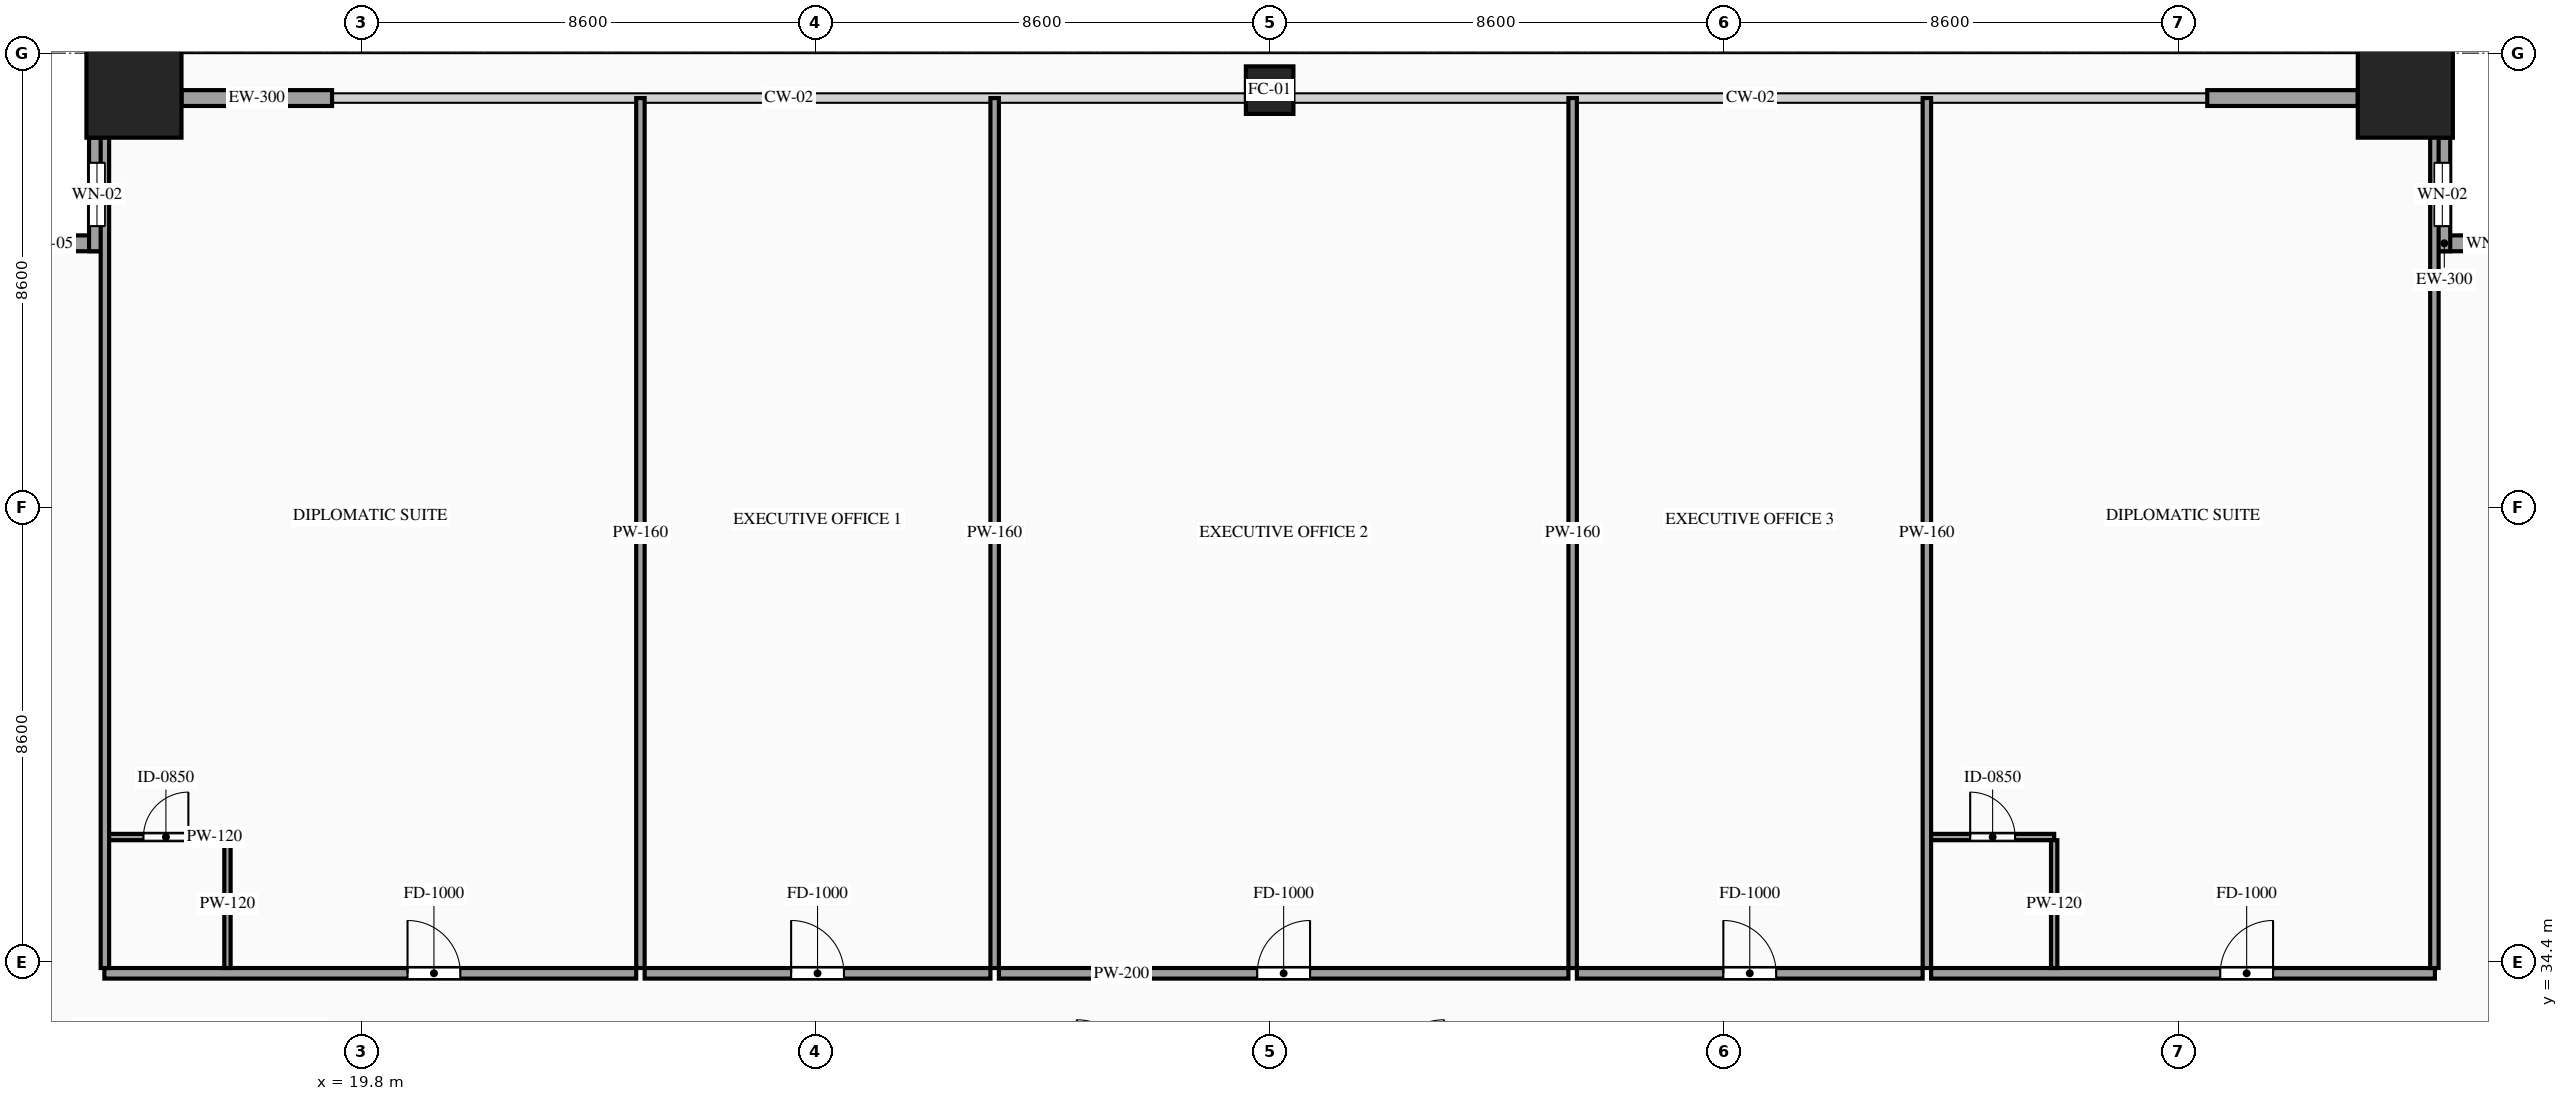
"""IFC4 building model, lengths in metres.
Left out: names, types, materials, properties, quantities, classifications, styles, units other than length and angle.
Written with IfcOpenShell. Run it as: python <this file> out.ifc"""

import sys

from ifc_helpers import new_model, si_unit, direction, frame, frame_2d, origin, origin_2d, place, context, subcontext, project, spatial, rectangle, hollow_rectangle, extrude, source, transform, mapped, element, fill, save


model = new_model("IFC4")
c1 = context("Model", 3, precision=1e-05, world=origin(), true_north=direction((0.0, 1.0)))
c2 = subcontext(c1, "Body", "Model", "MODEL_VIEW")
j1 = project(units=[si_unit("LENGTHUNIT", "METRE"), si_unit("PLANEANGLEUNIT", "RADIAN")], contexts=[c1])
p1 = place(None, origin())
s1 = spatial("IfcSite", under=j1, at=p1, CompositionType="ELEMENT")
p2 = place(p1, origin())
s2 = spatial("IfcBuilding", under=s1, at=p2, CompositionType="ELEMENT")
p3 = place(p2, frame((0.0, 0.0, 64.0)))
s3 = spatial("IfcBuildingStorey", under=s2, at=p3, CompositionType="ELEMENT", Elevation=64.0)
m1 = source(origin(), c2, "Body", "SweptSolid", [
    extrude(hollow_rectangle(XDim=1.8, YDim=1.8, WallThickness=0.08, at=origin_2d()), origin(), (0.0, 0.0, 1.0), 3.6),
])
p4 = place(p3, frame((15.5, 50.9, 0.0), z_axis=(0.0, 0.0, 1.0), x_axis=(1.0, 0.0, 0.0)))
e1 = element("IfcColumn", 1, at=p4, inside=s3, PredefinedType="COLUMN", context=c2, shape_type="MappedRepresentation", body=[
    mapped(m1, transform((0.0, 0.0, 0.0), scale=1.0)),
])
m2 = source(origin(), c2, "Body", "SweptSolid", [
    extrude(hollow_rectangle(XDim=0.9, YDim=0.9, WallThickness=0.042, at=origin_2d()), origin(), (0.0, 0.0, 1.0), 3.6),
])
p5 = place(p3, frame((37.0, 50.9, 0.0), z_axis=(0.0, 0.0, 1.0), x_axis=(1.0, 0.0, 0.0)))
e2 = element("IfcColumn", 2, at=p5, inside=s3, PredefinedType="COLUMN", context=c2, shape_type="MappedRepresentation", body=[
    mapped(m2, transform((0.0, 0.0, 0.0), scale=1.0)),
])
p6 = place(p3, frame((58.5, 50.9, 0.0), z_axis=(0.0, 0.0, 1.0), x_axis=(1.0, 0.0, 0.0)))
e3 = element("IfcColumn", 3, at=p6, inside=s3, PredefinedType="COLUMN", context=c2, shape_type="MappedRepresentation", body=[
    mapped(m1, transform((0.0, 0.0, 0.0), scale=1.0)),
])
p7 = place(p3, frame((14.95, 48.0, 0.0), z_axis=(0.0, 0.0, 1.0), x_axis=(-1.0, 0.0, 0.0)))
e4 = element("IfcWall", 4, at=p7, inside=s3, PredefinedType="SOLIDWALL", context=c2, shape_type="SweptSolid", body=[
    extrude(rectangle(XDim=2.15, YDim=0.3, at=frame_2d((1.075, 0.0))), origin(), (0.0, 0.0, 1.0), 3.38),
])
p8 = place(p7, frame((0.625, 0.0, 0.85)))
e5 = element("IfcOpeningElement", 5, at=p8, cuts=e4, PredefinedType="OPENING", context=c2, shape_type="SweptSolid", body=[
    extrude(rectangle(XDim=0.9, YDim=1.5, at=frame_2d((0.45, 0.75))), frame((0.0, 0.165, 0.0), z_axis=(0.0, -1.0, 0.0), x_axis=(1.0, 0.0, 0.0)), (0.0, 0.0, 1.0), 0.33),
])
p9 = place(p3, frame((14.8, 50.0, 0.0), z_axis=(0.0, 0.0, 1.0), x_axis=(0.0, -1.0, 0.0)))
e6 = element("IfcWall", 6, at=p9, inside=s3, PredefinedType="SOLIDWALL", context=c2, shape_type="SweptSolid", body=[
    extrude(rectangle(XDim=2.15, YDim=0.3, at=frame_2d((1.075, 0.0))), origin(), (0.0, 0.0, 1.0), 3.38),
])
p10 = place(p9, frame((0.475, 0.0, 0.85)))
e7 = element("IfcOpeningElement", 7, at=p10, cuts=e6, PredefinedType="OPENING", context=c2, shape_type="SweptSolid", body=[
    extrude(rectangle(XDim=1.2, YDim=2.1, at=frame_2d((0.6, 1.05))), frame((0.0, 0.165, 0.0), z_axis=(0.0, -1.0, 0.0), x_axis=(1.0, 0.0, 0.0)), (0.0, 0.0, 1.0), 0.33),
])
p11 = place(p3, frame((61.2, 48.0, 0.0), z_axis=(0.0, 0.0, 1.0), x_axis=(-1.0, 0.0, 0.0)))
e8 = element("IfcWall", 8, at=p11, inside=s3, PredefinedType="SOLIDWALL", context=c2, shape_type="SweptSolid", body=[
    extrude(rectangle(XDim=2.15, YDim=0.3, at=frame_2d((1.075, 0.0))), origin(), (0.0, 0.0, 1.0), 3.38),
])
p12 = place(p11, frame((0.625, 0.0, 0.85)))
e9 = element("IfcOpeningElement", 9, at=p12, cuts=e8, PredefinedType="OPENING", context=c2, shape_type="SweptSolid", body=[
    extrude(rectangle(XDim=0.9, YDim=1.5, at=frame_2d((0.45, 0.75))), frame((0.0, 0.165, 0.0), z_axis=(0.0, -1.0, 0.0), x_axis=(1.0, 0.0, 0.0)), (0.0, 0.0, 1.0), 0.33),
])
p13 = place(p3, frame((59.2, 47.85, 0.0), z_axis=(0.0, 0.0, 1.0), x_axis=(0.0, 1.0, 0.0)))
e10 = element("IfcWall", 10, at=p13, inside=s3, PredefinedType="SOLIDWALL", context=c2, shape_type="SweptSolid", body=[
    extrude(rectangle(XDim=2.15, YDim=0.3, at=frame_2d((1.075, 0.0))), origin(), (0.0, 0.0, 1.0), 3.38),
])
p14 = place(p13, frame((0.475, 0.0, 0.85)))
e11 = element("IfcOpeningElement", 11, at=p14, cuts=e10, PredefinedType="OPENING", context=c2, shape_type="SweptSolid", body=[
    extrude(rectangle(XDim=1.2, YDim=2.1, at=frame_2d((0.6, 1.05))), frame((0.0, 0.165, 0.0), z_axis=(0.0, -1.0, 0.0), x_axis=(1.0, 0.0, 0.0)), (0.0, 0.0, 1.0), 0.33),
])
m3 = source(origin(), c2, "Body", "SweptSolid", [
    extrude(rectangle(XDim=2.85, YDim=0.3, at=frame_2d((1.425, 0.0))), origin(), (0.0, 0.0, 1.0), 2.775),
])
for number, where, z_axis, x_axis in (
    (12, (16.4, 50.75, 0.0), (0.0, 0.0, 1.0), (1.0, 0.0, 0.0)),
    (13, (54.75, 50.75, 0.0), (0.0, 0.0, 1.0), (1.0, 0.0, 0.0)),
):
    element("IfcWall", number, at=place(p3, frame(where, z_axis=z_axis, x_axis=x_axis)), inside=s3, PredefinedType="SOLIDWALL", context=c2, shape_type="MappedRepresentation", body=[
        mapped(m3, transform((0.0, 0.0, 0.0), scale=1.0)),
    ])
p15 = place(p3, frame((14.94, 34.18, 0.0), z_axis=(0.0, 0.0, 1.0), x_axis=(1.0, 0.0, 0.0)))
e14 = element("IfcWall", 14, at=p15, inside=s3, PredefinedType="PARTITIONING", context=c2, shape_type="SweptSolid", body=[
    extrude(rectangle(XDim=10.068, YDim=0.2, at=frame_2d((5.034, 0.0))), origin(), (0.0, 0.0, 1.0), 3.38),
])
p16 = place(p15, frame((5.739, 0.0, 0.0)))
e15 = element("IfcOpeningElement", 15, at=p16, cuts=e14, PredefinedType="OPENING", context=c2, shape_type="SweptSolid", body=[
    extrude(rectangle(XDim=1.0, YDim=2.2, at=frame_2d((0.5, 1.1))), frame((0.0, 0.115, 0.0), z_axis=(0.0, -1.0, 0.0), x_axis=(1.0, 0.0, 0.0)), (0.0, 0.0, 1.0), 0.23),
])
m4 = source(origin(), c2, "Body", "SweptSolid", [
    extrude(rectangle(XDim=16.47, YDim=0.16, at=frame_2d((8.235, 0.0))), origin(), (0.0, 0.0, 1.0), 3.38),
])
p17 = place(p3, frame((25.088, 34.28, 0.0), z_axis=(0.0, 0.0, 1.0), x_axis=(0.0, 1.0, 0.0)))
e16 = element("IfcWall", 16, at=p17, inside=s3, PredefinedType="PARTITIONING", context=c2, shape_type="MappedRepresentation", body=[
    mapped(m4, transform((0.0, 0.0, 0.0), scale=1.0)),
])
p18 = place(p3, frame((14.94, 36.76, 0.0), z_axis=(0.0, 0.0, 1.0), x_axis=(1.0, 0.0, 0.0)))
e17 = element("IfcWall", 17, at=p18, inside=s3, PredefinedType="PARTITIONING", context=c2, shape_type="SweptSolid", body=[
    extrude(rectangle(XDim=2.33, YDim=0.12, at=frame_2d((1.165, 0.0))), origin(), (0.0, 0.0, 1.0), 3.38),
])
p19 = place(p18, frame((0.74, 0.0, 0.0)))
e18 = element("IfcOpeningElement", 18, at=p19, cuts=e17, PredefinedType="OPENING", context=c2, shape_type="SweptSolid", body=[
    extrude(rectangle(XDim=0.85, YDim=2.1, at=frame_2d((0.425, 1.05))), frame((0.0, 0.075, 0.0), z_axis=(0.0, -1.0, 0.0), x_axis=(1.0, 0.0, 0.0)), (0.0, 0.0, 1.0), 0.15),
])
m5 = source(origin(), c2, "Body", "SweptSolid", [
    extrude(rectangle(XDim=2.42, YDim=0.12, at=frame_2d((1.21, 0.0))), origin(), (0.0, 0.0, 1.0), 3.38),
])
p20 = place(p3, frame((17.27, 34.28, 0.0), z_axis=(0.0, 0.0, 1.0), x_axis=(0.0, 1.0, 0.0)))
e19 = element("IfcWall", 19, at=p20, inside=s3, PredefinedType="PARTITIONING", context=c2, shape_type="MappedRepresentation", body=[
    mapped(m5, transform((0.0, 0.0, 0.0), scale=1.0)),
])
p21 = place(p3, frame((25.168, 34.18, 0.0), z_axis=(0.0, 0.0, 1.0), x_axis=(1.0, 0.0, 0.0)))
e20 = element("IfcWall", 20, at=p21, inside=s3, PredefinedType="PARTITIONING", context=c2, shape_type="SweptSolid", body=[
    extrude(rectangle(XDim=6.546, YDim=0.2, at=frame_2d((3.273, 0.0))), origin(), (0.0, 0.0, 1.0), 3.38),
])
p22 = place(p21, frame((2.773, 0.0, 0.0)))
e21 = element("IfcOpeningElement", 21, at=p22, cuts=e20, PredefinedType="OPENING", context=c2, shape_type="SweptSolid", body=[
    extrude(rectangle(XDim=1.0, YDim=2.2, at=frame_2d((0.5, 1.1))), frame((0.0, 0.115, 0.0), z_axis=(0.0, -1.0, 0.0), x_axis=(1.0, 0.0, 0.0)), (0.0, 0.0, 1.0), 0.23),
])
p23 = place(p3, frame((31.794, 34.28, 0.0), z_axis=(0.0, 0.0, 1.0), x_axis=(0.0, 1.0, 0.0)))
e22 = element("IfcWall", 22, at=p23, inside=s3, PredefinedType="PARTITIONING", context=c2, shape_type="MappedRepresentation", body=[
    mapped(m4, transform((0.0, 0.0, 0.0), scale=1.0)),
])
p24 = place(p3, frame((31.874, 34.18, 0.0), z_axis=(0.0, 0.0, 1.0), x_axis=(1.0, 0.0, 0.0)))
e23 = element("IfcWall", 23, at=p24, inside=s3, PredefinedType="PARTITIONING", context=c2, shape_type="SweptSolid", body=[
    extrude(rectangle(XDim=10.782, YDim=0.2, at=frame_2d((5.391, 0.0))), origin(), (0.0, 0.0, 1.0), 3.38),
])
p25 = place(p24, frame((4.891, 0.0, 0.0)))
e24 = element("IfcOpeningElement", 24, at=p25, cuts=e23, PredefinedType="OPENING", context=c2, shape_type="SweptSolid", body=[
    extrude(rectangle(XDim=1.0, YDim=2.2, at=frame_2d((0.5, 1.1))), frame((0.0, 0.115, 0.0), z_axis=(0.0, -1.0, 0.0), x_axis=(1.0, 0.0, 0.0)), (0.0, 0.0, 1.0), 0.23),
])
p26 = place(p3, frame((42.736, 34.28, 0.0), z_axis=(0.0, 0.0, 1.0), x_axis=(0.0, 1.0, 0.0)))
e25 = element("IfcWall", 25, at=p26, inside=s3, PredefinedType="PARTITIONING", context=c2, shape_type="MappedRepresentation", body=[
    mapped(m4, transform((0.0, 0.0, 0.0), scale=1.0)),
])
p27 = place(p3, frame((42.816, 34.18, 0.0), z_axis=(0.0, 0.0, 1.0), x_axis=(1.0, 0.0, 0.0)))
e26 = element("IfcWall", 26, at=p27, inside=s3, PredefinedType="PARTITIONING", context=c2, shape_type="SweptSolid", body=[
    extrude(rectangle(XDim=6.546, YDim=0.2, at=frame_2d((3.273, 0.0))), origin(), (0.0, 0.0, 1.0), 3.38),
])
p28 = place(p27, frame((2.773, 0.0, 0.0)))
e27 = element("IfcOpeningElement", 27, at=p28, cuts=e26, PredefinedType="OPENING", context=c2, shape_type="SweptSolid", body=[
    extrude(rectangle(XDim=1.0, YDim=2.2, at=frame_2d((0.5, 1.1))), frame((0.0, 0.115, 0.0), z_axis=(0.0, -1.0, 0.0), x_axis=(1.0, 0.0, 0.0)), (0.0, 0.0, 1.0), 0.23),
])
p29 = place(p3, frame((49.442, 34.28, 0.0), z_axis=(0.0, 0.0, 1.0), x_axis=(0.0, 1.0, 0.0)))
e28 = element("IfcWall", 28, at=p29, inside=s3, PredefinedType="PARTITIONING", context=c2, shape_type="MappedRepresentation", body=[
    mapped(m4, transform((0.0, 0.0, 0.0), scale=1.0)),
])
p30 = place(p3, frame((49.522, 34.18, 0.0), z_axis=(0.0, 0.0, 1.0), x_axis=(1.0, 0.0, 0.0)))
e29 = element("IfcWall", 29, at=p30, inside=s3, PredefinedType="PARTITIONING", context=c2, shape_type="SweptSolid", body=[
    extrude(rectangle(XDim=9.538, YDim=0.2, at=frame_2d((4.769, 0.0))), origin(), (0.0, 0.0, 1.0), 3.38),
])
p31 = place(p30, frame((5.474, 0.0, 0.0)))
e30 = element("IfcOpeningElement", 30, at=p31, cuts=e29, PredefinedType="OPENING", context=c2, shape_type="SweptSolid", body=[
    extrude(rectangle(XDim=1.0, YDim=2.2, at=frame_2d((0.5, 1.1))), frame((0.0, 0.115, 0.0), z_axis=(0.0, -1.0, 0.0), x_axis=(1.0, 0.0, 0.0)), (0.0, 0.0, 1.0), 0.23),
])
m6 = source(origin(), c2, "Body", "SweptSolid", [
    extrude(rectangle(XDim=16.32, YDim=0.16, at=frame_2d((8.16, 0.0))), origin(), (0.0, 0.0, 1.0), 3.38),
])
for number, where, z_axis, x_axis in (
    (31, (14.95, 34.28, 0.0), (0.0, 0.0, 1.0), (0.0, 1.0, 0.0)),
    (32, (59.05, 34.28, 0.0), (0.0, 0.0, 1.0), (0.0, 1.0, 0.0)),
):
    element("IfcWall", number, at=place(p3, frame(where, z_axis=z_axis, x_axis=x_axis)), inside=s3, PredefinedType="PARTITIONING", context=c2, shape_type="MappedRepresentation", body=[
        mapped(m6, transform((0.0, 0.0, 0.0), scale=1.0)),
    ])
p32 = place(p3, frame((49.522, 36.76, 0.0), z_axis=(0.0, 0.0, 1.0), x_axis=(1.0, 0.0, 0.0)))
e33 = element("IfcWall", 33, at=p32, inside=s3, PredefinedType="PARTITIONING", context=c2, shape_type="SweptSolid", body=[
    extrude(rectangle(XDim=2.33, YDim=0.12, at=frame_2d((1.165, 0.0))), origin(), (0.0, 0.0, 1.0), 3.38),
])
p33 = place(p32, frame((0.74, 0.0, 0.0)))
e34 = element("IfcOpeningElement", 34, at=p33, cuts=e33, PredefinedType="OPENING", context=c2, shape_type="SweptSolid", body=[
    extrude(rectangle(XDim=0.85, YDim=2.1, at=frame_2d((0.425, 1.05))), frame((0.0, 0.075, 0.0), z_axis=(0.0, -1.0, 0.0), x_axis=(1.0, 0.0, 0.0)), (0.0, 0.0, 1.0), 0.15),
])
p34 = place(p3, frame((51.852, 34.28, 0.0), z_axis=(0.0, 0.0, 1.0), x_axis=(0.0, 1.0, 0.0)))
e35 = element("IfcWall", 35, at=p34, inside=s3, PredefinedType="PARTITIONING", context=c2, shape_type="MappedRepresentation", body=[
    mapped(m5, transform((0.0, 0.0, 0.0), scale=1.0)),
])
m7 = source(origin(), c2, "Body", "SweptSolid", [
    extrude(rectangle(XDim=0.9, YDim=1.5, at=frame_2d((0.45, 0.75))), frame((0.0, 0.03, 0.0), z_axis=(0.0, -1.0, 0.0), x_axis=(1.0, 0.0, 0.0)), (0.0, 0.0, 1.0), 0.06),
])
p35 = place(p8, origin())
e36 = element("IfcWindow", 36, at=p35, inside=s3, PartitioningType="SINGLE_PANEL", PredefinedType="WINDOW", context=c2, shape_type="MappedRepresentation", body=[
    mapped(m7, transform((0.0, 0.0, 0.0), scale=1.0)),
])
fill(e5, e36)
m8 = source(origin(), c2, "Body", "SweptSolid", [
    extrude(rectangle(XDim=1.2, YDim=2.1, at=frame_2d((0.6, 1.05))), frame((0.0, 0.03, 0.0), z_axis=(0.0, -1.0, 0.0), x_axis=(1.0, 0.0, 0.0)), (0.0, 0.0, 1.0), 0.06),
])
p36 = place(p10, origin())
e37 = element("IfcWindow", 37, at=p36, inside=s3, PartitioningType="SINGLE_PANEL", PredefinedType="WINDOW", context=c2, shape_type="MappedRepresentation", body=[
    mapped(m8, transform((0.0, 0.0, 0.0), scale=1.0)),
])
fill(e7, e37)
p37 = place(p12, origin())
e38 = element("IfcWindow", 38, at=p37, inside=s3, PartitioningType="SINGLE_PANEL", PredefinedType="WINDOW", context=c2, shape_type="MappedRepresentation", body=[
    mapped(m7, transform((0.0, 0.0, 0.0), scale=1.0)),
])
fill(e9, e38)
p38 = place(p14, origin())
e39 = element("IfcWindow", 39, at=p38, inside=s3, PartitioningType="SINGLE_PANEL", PredefinedType="WINDOW", context=c2, shape_type="MappedRepresentation", body=[
    mapped(m8, transform((0.0, 0.0, 0.0), scale=1.0)),
])
fill(e11, e39)
m9 = source(origin(), c2, "Body", "SweptSolid", [
    extrude(rectangle(XDim=1.0, YDim=2.2, at=frame_2d((0.5, 1.1))), frame((0.0, 0.025, 0.0), z_axis=(0.0, -1.0, 0.0), x_axis=(1.0, 0.0, 0.0)), (0.0, 0.0, 1.0), 0.05),
])
p39 = place(p16, origin())
e40 = element("IfcDoor", 40, at=p39, inside=s3, OperationType="SINGLE_SWING_LEFT", PredefinedType="DOOR", context=c2, shape_type="MappedRepresentation", body=[
    mapped(m9, transform((0.0, 0.0, 0.0), scale=1.0)),
])
fill(e15, e40)
m10 = source(origin(), c2, "Body", "SweptSolid", [
    extrude(rectangle(XDim=0.85, YDim=2.1, at=frame_2d((0.425, 1.05))), frame((0.0, 0.025, 0.0), z_axis=(0.0, -1.0, 0.0), x_axis=(1.0, 0.0, 0.0)), (0.0, 0.0, 1.0), 0.05),
])
p40 = place(p19, origin())
e41 = element("IfcDoor", 41, at=p40, inside=s3, OperationType="SINGLE_SWING_RIGHT", PredefinedType="DOOR", context=c2, shape_type="MappedRepresentation", body=[
    mapped(m10, transform((0.0, 0.0, 0.0), scale=1.0)),
])
fill(e18, e41)
p41 = place(p22, origin())
e42 = element("IfcDoor", 42, at=p41, inside=s3, OperationType="SINGLE_SWING_LEFT", PredefinedType="DOOR", context=c2, shape_type="MappedRepresentation", body=[
    mapped(m9, transform((0.0, 0.0, 0.0), scale=1.0)),
])
fill(e21, e42)
p42 = place(p25, origin())
e43 = element("IfcDoor", 43, at=p42, inside=s3, OperationType="SINGLE_SWING_RIGHT", PredefinedType="DOOR", context=c2, shape_type="MappedRepresentation", body=[
    mapped(m9, transform((0.0, 0.0, 0.0), scale=1.0)),
])
fill(e24, e43)
p43 = place(p28, origin())
e44 = element("IfcDoor", 44, at=p43, inside=s3, OperationType="SINGLE_SWING_LEFT", PredefinedType="DOOR", context=c2, shape_type="MappedRepresentation", body=[
    mapped(m9, transform((0.0, 0.0, 0.0), scale=1.0)),
])
fill(e27, e44)
p44 = place(p31, origin())
e45 = element("IfcDoor", 45, at=p44, inside=s3, OperationType="SINGLE_SWING_RIGHT", PredefinedType="DOOR", context=c2, shape_type="MappedRepresentation", body=[
    mapped(m9, transform((0.0, 0.0, 0.0), scale=1.0)),
])
fill(e30, e45)
p45 = place(p33, origin())
e46 = element("IfcDoor", 46, at=p45, inside=s3, OperationType="SINGLE_SWING_LEFT", PredefinedType="DOOR", context=c2, shape_type="MappedRepresentation", body=[
    mapped(m10, transform((0.0, 0.0, 0.0), scale=1.0)),
])
fill(e34, e46)
save(model, sys.argv[1])
